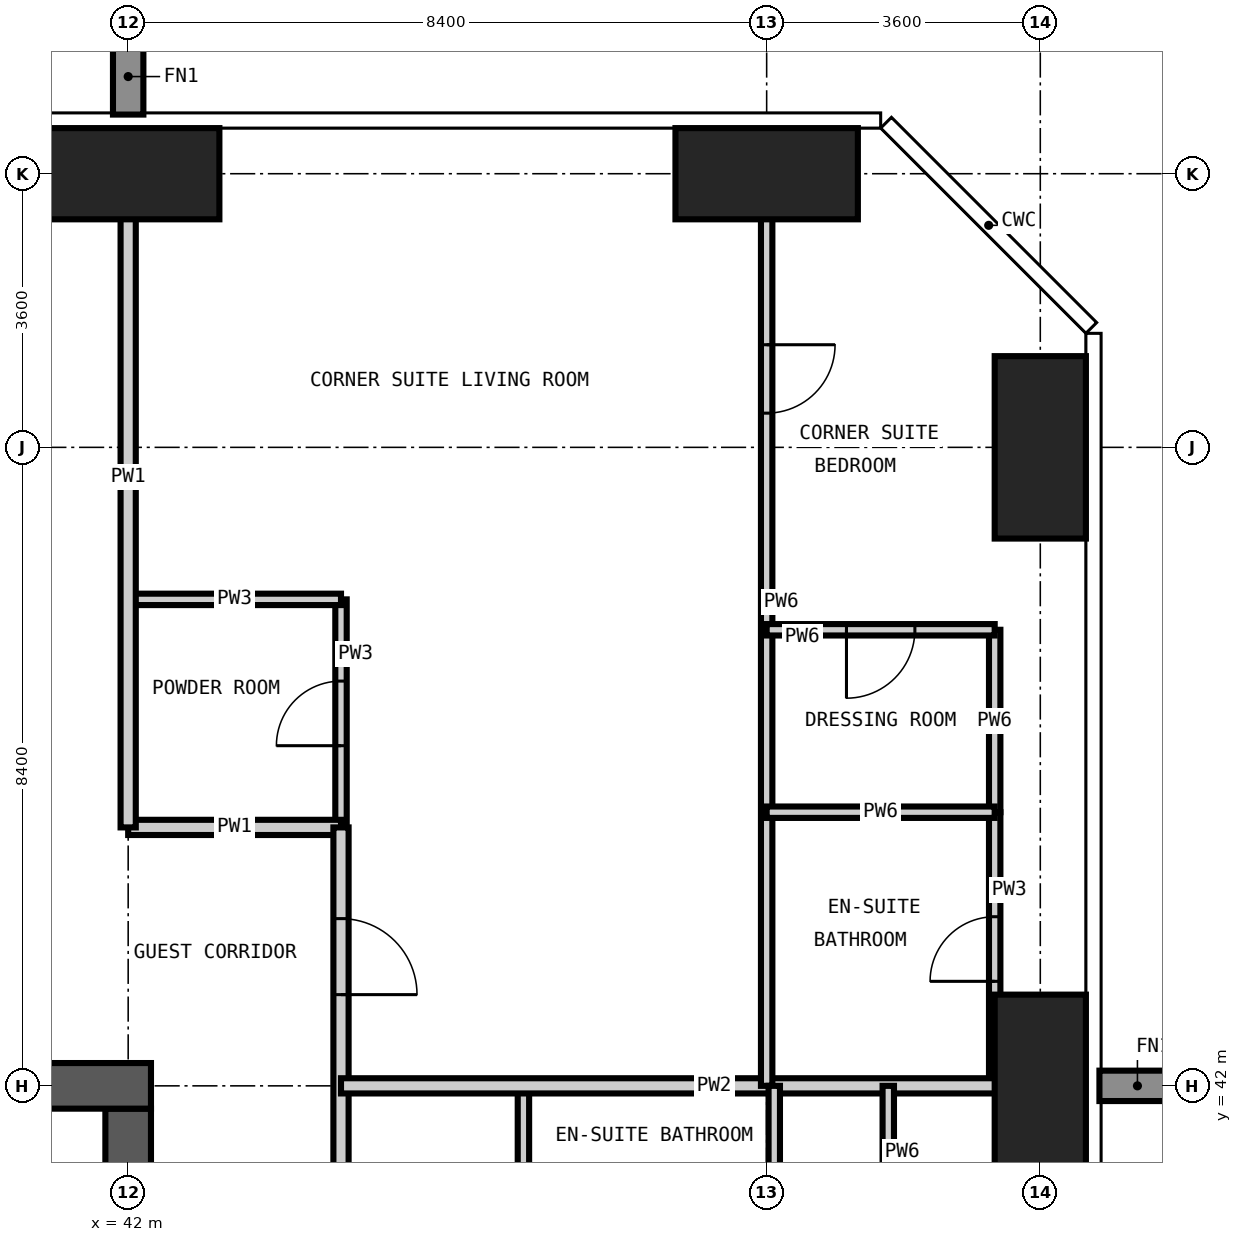
"""IFC4 building model, lengths in metres.
Left out: names, types, materials, properties, quantities, classifications, styles, units other than length and angle.
Written with IfcOpenShell. Run it as: python <this file> out.ifc"""

import sys

from ifc_helpers import new_model, si_unit, direction, frame, frame_2d, origin, origin_2d, place, context, subcontext, project, spatial, rectangle, extrude, element, fill, save


model = new_model("IFC4")
c1 = context("Model", 3, precision=1e-05, world=origin(), true_north=direction((0.0, 1.0)))
c2 = subcontext(c1, "Body", "Model", "MODEL_VIEW")
j1 = project(units=[si_unit("LENGTHUNIT", "METRE"), si_unit("PLANEANGLEUNIT", "RADIAN")], contexts=[c1])
p1 = place(None, origin())
s1 = spatial("IfcSite", under=j1, at=p1, CompositionType="ELEMENT")
p2 = place(p1, origin())
s2 = spatial("IfcBuilding", under=s1, at=p2, CompositionType="ELEMENT")
p3 = place(p2, frame((0.0, 0.0, 180.6)))
s3 = spatial("IfcBuildingStorey", under=s2, at=p3, CompositionType="ELEMENT", Elevation=180.6)
for number, where, z_axis, x_axis in (
    (1, (42.0, 54.0, -0.35), (0.0, 0.0, 1.0), (1.0, 0.0, 0.0)),
    (2, (50.4, 54.0, -0.35), (0.0, 0.0, 1.0), (1.0, 0.0, 0.0)),
):
    element("IfcColumn", number, at=place(p3, frame(where, z_axis=z_axis, x_axis=x_axis)), inside=s3, PredefinedType="COLUMN", context=c2, shape_type="SweptSolid", body=[
        extrude(rectangle(XDim=2.4, YDim=1.2, at=origin_2d()), origin(), (0.0, 0.0, 1.0), 3.6),
    ])
for number, where, z_axis, x_axis in (
    (3, (54.0, 42.0, -0.35), (0.0, 0.0, 1.0), (1.0, 0.0, 0.0)),
    (4, (54.0, 50.4, -0.35), (0.0, 0.0, 1.0), (1.0, 0.0, 0.0)),
):
    element("IfcColumn", number, at=place(p3, frame(where, z_axis=z_axis, x_axis=x_axis)), inside=s3, PredefinedType="COLUMN", context=c2, shape_type="SweptSolid", body=[
        extrude(rectangle(XDim=1.2, YDim=2.4, at=origin_2d()), origin(), (0.0, 0.0, 1.0), 3.6),
    ])
p4 = place(p3, frame((42.0, 17.1, -0.35), z_axis=(0.0, 0.0, 1.0), x_axis=(0.0, 1.0, 0.0)))
e5 = element("IfcWall", 5, at=p4, inside=s3, PredefinedType="SHEAR", context=c2, shape_type="SweptSolid", body=[
    extrude(rectangle(XDim=24.6, YDim=0.6, at=frame_2d((12.3, 0.0))), origin(), (0.0, 0.0, 1.0), 3.6),
])
p5 = place(p4, frame((0.5, 0.0, 0.35)))
e6 = element("IfcOpeningElement", 6, at=p5, cuts=e5, PredefinedType="OPENING", context=c2, shape_type="SweptSolid", body=[
    extrude(rectangle(XDim=1.2, YDim=2.2, at=frame_2d((0.6, 1.1))), frame((0.0, 0.31, 0.0), z_axis=(0.0, -1.0, 0.0), x_axis=(1.0, 0.0, 0.0)), (0.0, 0.0, 1.0), 0.62),
])
p6 = place(p4, frame((11.8, 0.0, 0.35)))
e7 = element("IfcOpeningElement", 7, at=p6, cuts=e5, PredefinedType="OPENING", context=c2, shape_type="SweptSolid", body=[
    extrude(rectangle(XDim=1.0, YDim=2.1, at=frame_2d((0.5, 1.05))), frame((0.0, 0.31, 0.0), z_axis=(0.0, -1.0, 0.0), x_axis=(1.0, 0.0, 0.0)), (0.0, 0.0, 1.0), 0.62),
])
p7 = place(p4, frame((20.2, 0.0, 0.35)))
e8 = element("IfcOpeningElement", 8, at=p7, cuts=e5, PredefinedType="OPENING", context=c2, shape_type="SweptSolid", body=[
    extrude(rectangle(XDim=1.0, YDim=2.1, at=frame_2d((0.5, 1.05))), frame((0.0, 0.31, 0.0), z_axis=(0.0, -1.0, 0.0), x_axis=(1.0, 0.0, 0.0)), (0.0, 0.0, 1.0), 0.62),
])
p8 = place(p3, frame((42.3, 42.0, -0.35), z_axis=(0.0, 0.0, 1.0), x_axis=(-1.0, 0.0, 0.0)))
e9 = element("IfcWall", 9, at=p8, inside=s3, PredefinedType="SHEAR", context=c2, shape_type="SweptSolid", body=[
    extrude(rectangle(XDim=25.8, YDim=0.6, at=frame_2d((12.9, 0.0))), origin(), (0.0, 0.0, 1.0), 3.6),
])
p9 = place(p8, frame((20.8, 0.0, 0.35)))
e10 = element("IfcOpeningElement", 10, at=p9, cuts=e9, PredefinedType="OPENING", context=c2, shape_type="SweptSolid", body=[
    extrude(rectangle(XDim=1.0, YDim=2.1, at=frame_2d((0.5, 1.05))), frame((0.0, 0.31, 0.0), z_axis=(0.0, -1.0, 0.0), x_axis=(1.0, 0.0, 0.0)), (0.0, 0.0, 1.0), 0.62),
])
p10 = place(p8, frame((10.2, 0.0, 0.35)))
e11 = element("IfcOpeningElement", 11, at=p10, cuts=e9, PredefinedType="OPENING", context=c2, shape_type="SweptSolid", body=[
    extrude(rectangle(XDim=1.2, YDim=2.2, at=frame_2d((0.6, 1.1))), frame((0.0, 0.31, 0.0), z_axis=(0.0, -1.0, 0.0), x_axis=(1.0, 0.0, 0.0)), (0.0, 0.0, 1.0), 0.62),
])
p11 = place(p3, frame((44.8, 45.4, 0.0), z_axis=(0.0, 0.0, 1.0), x_axis=(0.0, 1.0, 0.0)))
e12 = element("IfcWall", 12, at=p11, inside=s3, PredefinedType="PARTITIONING", context=c2, shape_type="SweptSolid", body=[
    extrude(rectangle(XDim=3.0, YDim=0.15, at=frame_2d((1.5, 0.0))), origin(), (0.0, 0.0, 1.0), 3.25),
])
p12 = place(p11, frame((1.075, 0.0, 0.0)))
e13 = element("IfcOpeningElement", 13, at=p12, cuts=e12, PredefinedType="OPENING", context=c2, shape_type="SweptSolid", body=[
    extrude(rectangle(XDim=0.85, YDim=2.1, at=frame_2d((0.425, 1.05))), frame((0.0, 0.085, 0.0), z_axis=(0.0, -1.0, 0.0), x_axis=(1.0, 0.0, 0.0)), (0.0, 0.0, 1.0), 0.17),
])
p13 = place(p3, frame((47.2, 39.6, 0.0), z_axis=(0.0, 0.0, 1.0), x_axis=(0.0, 1.0, 0.0)))
e14 = element("IfcWall", 14, at=p13, inside=s3, PredefinedType="PARTITIONING", context=c2, shape_type="SweptSolid", body=[
    extrude(rectangle(XDim=2.4, YDim=0.15, at=frame_2d((1.2, 0.0))), origin(), (0.0, 0.0, 1.0), 3.25),
])
p14 = place(p3, frame((53.4, 42.0, 0.0), z_axis=(0.0, 0.0, 1.0), x_axis=(0.0, 1.0, 0.0)))
e15 = element("IfcWall", 15, at=p14, inside=s3, PredefinedType="PARTITIONING", context=c2, shape_type="SweptSolid", body=[
    extrude(rectangle(XDim=3.6, YDim=0.15, at=frame_2d((1.8, 0.0))), origin(), (0.0, 0.0, 1.0), 3.25),
])
p15 = place(p14, frame((1.375, 0.0, 0.0)))
e16 = element("IfcOpeningElement", 16, at=p15, cuts=e15, PredefinedType="OPENING", context=c2, shape_type="SweptSolid", body=[
    extrude(rectangle(XDim=0.85, YDim=2.1, at=frame_2d((0.425, 1.05))), frame((0.0, 0.085, 0.0), z_axis=(0.0, -1.0, 0.0), x_axis=(1.0, 0.0, 0.0)), (0.0, 0.0, 1.0), 0.17),
])
p16 = place(p3, frame((42.0, 48.4, 0.0), z_axis=(0.0, 0.0, 1.0), x_axis=(1.0, 0.0, 0.0)))
e17 = element("IfcWall", 17, at=p16, inside=s3, PredefinedType="PARTITIONING", context=c2, shape_type="SweptSolid", body=[
    extrude(rectangle(XDim=2.8, YDim=0.15, at=frame_2d((1.4, 0.0))), origin(), (0.0, 0.0, 1.0), 3.25),
])
p17 = place(p3, frame((42.0, 45.4, 0.0), z_axis=(0.0, 0.0, 1.0), x_axis=(1.0, 0.0, 0.0)))
e18 = element("IfcWall", 18, at=p17, inside=s3, PredefinedType="PARTITIONING", context=c2, shape_type="SweptSolid", body=[
    extrude(rectangle(XDim=2.8, YDim=0.2, at=frame_2d((1.4, 0.0))), origin(), (0.0, 0.0, 1.0), 3.25),
])
p18 = place(p3, frame((42.0, 54.618, 0.0), z_axis=(0.0, 0.0, 1.0), x_axis=(0.0, -1.0, 0.0)))
e19 = element("IfcWall", 19, at=p18, inside=s3, PredefinedType="PARTITIONING", context=c2, shape_type="SweptSolid", body=[
    extrude(rectangle(XDim=9.218, YDim=0.2, at=frame_2d((4.609, 0.0))), origin(), (0.0, 0.0, 1.0), 3.25),
])
p19 = place(p3, frame((44.8, 45.4, 0.0), z_axis=(0.0, 0.0, 1.0), x_axis=(0.0, -1.0, 0.0)))
e20 = element("IfcWall", 20, at=p19, inside=s3, PredefinedType="PARTITIONING", context=c2, shape_type="SweptSolid", body=[
    extrude(rectangle(XDim=30.8, YDim=0.2, at=frame_2d((15.4, 0.0))), origin(), (0.0, 0.0, 1.0), 3.25),
])
p20 = place(p19, frame((26.0, 0.0, 0.0)))
e21 = element("IfcOpeningElement", 21, at=p20, cuts=e20, PredefinedType="OPENING", context=c2, shape_type="SweptSolid", body=[
    extrude(rectangle(XDim=1.0, YDim=2.2, at=frame_2d((0.5, 1.1))), frame((0.0, 0.11, 0.0), z_axis=(0.0, -1.0, 0.0), x_axis=(1.0, 0.0, 0.0)), (0.0, 0.0, 1.0), 0.22),
])
p21 = place(p19, frame((21.8, 0.0, 0.0)))
e22 = element("IfcOpeningElement", 22, at=p21, cuts=e20, PredefinedType="OPENING", context=c2, shape_type="SweptSolid", body=[
    extrude(rectangle(XDim=1.0, YDim=2.2, at=frame_2d((0.5, 1.1))), frame((0.0, 0.11, 0.0), z_axis=(0.0, -1.0, 0.0), x_axis=(1.0, 0.0, 0.0)), (0.0, 0.0, 1.0), 0.22),
])
p22 = place(p19, frame((17.6, 0.0, 0.0)))
e23 = element("IfcOpeningElement", 23, at=p22, cuts=e20, PredefinedType="OPENING", context=c2, shape_type="SweptSolid", body=[
    extrude(rectangle(XDim=1.0, YDim=2.2, at=frame_2d((0.5, 1.1))), frame((0.0, 0.11, 0.0), z_axis=(0.0, -1.0, 0.0), x_axis=(1.0, 0.0, 0.0)), (0.0, 0.0, 1.0), 0.22),
])
p23 = place(p19, frame((13.4, 0.0, 0.0)))
e24 = element("IfcOpeningElement", 24, at=p23, cuts=e20, PredefinedType="OPENING", context=c2, shape_type="SweptSolid", body=[
    extrude(rectangle(XDim=1.0, YDim=2.2, at=frame_2d((0.5, 1.1))), frame((0.0, 0.11, 0.0), z_axis=(0.0, -1.0, 0.0), x_axis=(1.0, 0.0, 0.0)), (0.0, 0.0, 1.0), 0.22),
])
p24 = place(p19, frame((9.2, 0.0, 0.0)))
e25 = element("IfcOpeningElement", 25, at=p24, cuts=e20, PredefinedType="OPENING", context=c2, shape_type="SweptSolid", body=[
    extrude(rectangle(XDim=1.0, YDim=2.2, at=frame_2d((0.5, 1.1))), frame((0.0, 0.11, 0.0), z_axis=(0.0, -1.0, 0.0), x_axis=(1.0, 0.0, 0.0)), (0.0, 0.0, 1.0), 0.22),
])
p25 = place(p19, frame((5.0, 0.0, 0.0)))
e26 = element("IfcOpeningElement", 26, at=p25, cuts=e20, PredefinedType="OPENING", context=c2, shape_type="SweptSolid", body=[
    extrude(rectangle(XDim=1.0, YDim=2.2, at=frame_2d((0.5, 1.1))), frame((0.0, 0.11, 0.0), z_axis=(0.0, -1.0, 0.0), x_axis=(1.0, 0.0, 0.0)), (0.0, 0.0, 1.0), 0.22),
])
p26 = place(p19, frame((29.2, 0.0, 0.0)))
e27 = element("IfcOpeningElement", 27, at=p26, cuts=e20, PredefinedType="OPENING", context=c2, shape_type="SweptSolid", body=[
    extrude(rectangle(XDim=1.0, YDim=2.2, at=frame_2d((0.5, 1.1))), frame((0.0, 0.11, 0.0), z_axis=(0.0, -1.0, 0.0), x_axis=(1.0, 0.0, 0.0)), (0.0, 0.0, 1.0), 0.22),
])
p27 = place(p19, frame((1.2, 0.0, 0.0)))
e28 = element("IfcOpeningElement", 28, at=p27, cuts=e20, PredefinedType="OPENING", context=c2, shape_type="SweptSolid", body=[
    extrude(rectangle(XDim=1.0, YDim=2.2, at=frame_2d((0.5, 1.1))), frame((0.0, 0.11, 0.0), z_axis=(0.0, -1.0, 0.0), x_axis=(1.0, 0.0, 0.0)), (0.0, 0.0, 1.0), 0.22),
])
p28 = place(p3, frame((44.8, 42.0, 0.0), z_axis=(0.0, 0.0, 1.0), x_axis=(1.0, 0.0, 0.0)))
e29 = element("IfcWall", 29, at=p28, inside=s3, PredefinedType="PARTITIONING", context=c2, shape_type="SweptSolid", body=[
    extrude(rectangle(XDim=9.818, YDim=0.2, at=frame_2d((4.909, 0.0))), origin(), (0.0, 0.0, 1.0), 3.25),
])
p29 = place(p3, frame((50.4, 42.0, 0.0), z_axis=(0.0, 0.0, 1.0), x_axis=(0.0, 1.0, 0.0)))
e30 = element("IfcWall", 30, at=p29, inside=s3, PredefinedType="PARTITIONING", context=c2, shape_type="SweptSolid", body=[
    extrude(rectangle(XDim=12.618, YDim=0.15, at=frame_2d((6.309, 0.0))), origin(), (0.0, 0.0, 1.0), 3.25),
])
p30 = place(p29, frame((8.85, 0.0, 0.0)))
e31 = element("IfcOpeningElement", 31, at=p30, cuts=e30, PredefinedType="OPENING", context=c2, shape_type="SweptSolid", body=[
    extrude(rectangle(XDim=0.9, YDim=2.1, at=frame_2d((0.45, 1.05))), frame((0.0, 0.085, 0.0), z_axis=(0.0, -1.0, 0.0), x_axis=(1.0, 0.0, 0.0)), (0.0, 0.0, 1.0), 0.17),
])
p31 = place(p3, frame((50.5, 39.6, 0.0), z_axis=(0.0, 0.0, 1.0), x_axis=(0.0, 1.0, 0.0)))
e32 = element("IfcWall", 32, at=p31, inside=s3, PredefinedType="PARTITIONING", context=c2, shape_type="SweptSolid", body=[
    extrude(rectangle(XDim=2.4, YDim=0.15, at=frame_2d((1.2, 0.0))), origin(), (0.0, 0.0, 1.0), 3.25),
])
p32 = place(p3, frame((52.0, 39.6, 0.0), z_axis=(0.0, 0.0, 1.0), x_axis=(0.0, 1.0, 0.0)))
e33 = element("IfcWall", 33, at=p32, inside=s3, PredefinedType="PARTITIONING", context=c2, shape_type="SweptSolid", body=[
    extrude(rectangle(XDim=2.4, YDim=0.15, at=frame_2d((1.2, 0.0))), origin(), (0.0, 0.0, 1.0), 3.25),
])
p33 = place(p32, frame((0.25, 0.0, 0.0)))
e34 = element("IfcOpeningElement", 34, at=p33, cuts=e33, PredefinedType="OPENING", context=c2, shape_type="SweptSolid", body=[
    extrude(rectangle(XDim=0.9, YDim=2.1, at=frame_2d((0.45, 1.05))), frame((0.0, 0.085, 0.0), z_axis=(0.0, -1.0, 0.0), x_axis=(1.0, 0.0, 0.0)), (0.0, 0.0, 1.0), 0.17),
])
p34 = place(p3, frame((53.4, 45.6, 0.0), z_axis=(0.0, 0.0, 1.0), x_axis=(0.0, 1.0, 0.0)))
e35 = element("IfcWall", 35, at=p34, inside=s3, PredefinedType="PARTITIONING", context=c2, shape_type="SweptSolid", body=[
    extrude(rectangle(XDim=2.4, YDim=0.15, at=frame_2d((1.2, 0.0))), origin(), (0.0, 0.0, 1.0), 3.25),
])
p35 = place(p3, frame((50.4, 45.6, 0.0), z_axis=(0.0, 0.0, 1.0), x_axis=(1.0, 0.0, 0.0)))
e36 = element("IfcWall", 36, at=p35, inside=s3, PredefinedType="PARTITIONING", context=c2, shape_type="SweptSolid", body=[
    extrude(rectangle(XDim=3.0, YDim=0.15, at=frame_2d((1.5, 0.0))), origin(), (0.0, 0.0, 1.0), 3.25),
])
p36 = place(p3, frame((50.4, 48.0, 0.0), z_axis=(0.0, 0.0, 1.0), x_axis=(1.0, 0.0, 0.0)))
e37 = element("IfcWall", 37, at=p36, inside=s3, PredefinedType="PARTITIONING", context=c2, shape_type="SweptSolid", body=[
    extrude(rectangle(XDim=3.0, YDim=0.15, at=frame_2d((1.5, 0.0))), origin(), (0.0, 0.0, 1.0), 3.25),
])
p37 = place(p36, frame((1.05, 0.0, 0.0)))
e38 = element("IfcOpeningElement", 38, at=p37, cuts=e37, PredefinedType="OPENING", context=c2, shape_type="SweptSolid", body=[
    extrude(rectangle(XDim=0.9, YDim=2.1, at=frame_2d((0.45, 1.05))), frame((0.0, 0.085, 0.0), z_axis=(0.0, -1.0, 0.0), x_axis=(1.0, 0.0, 0.0)), (0.0, 0.0, 1.0), 0.17),
])
p38 = place(p27, origin())
e39 = element("IfcDoor", 39, at=p38, inside=s3, OperationType="SINGLE_SWING_RIGHT", PredefinedType="DOOR", context=c2, shape_type="SweptSolid", body=[
    extrude(rectangle(XDim=1.0, YDim=2.2, at=frame_2d((0.5, 1.1))), frame((0.0, 0.025, 0.0), z_axis=(0.0, -1.0, 0.0), x_axis=(1.0, 0.0, 0.0)), (0.0, 0.0, 1.0), 0.05),
])
fill(e28, e39)
p39 = place(p12, origin())
e40 = element("IfcDoor", 40, at=p39, inside=s3, OperationType="SINGLE_SWING_LEFT", PredefinedType="DOOR", context=c2, shape_type="SweptSolid", body=[
    extrude(rectangle(XDim=0.85, YDim=2.1, at=frame_2d((0.425, 1.05))), frame((0.0, 0.025, 0.0), z_axis=(0.0, -1.0, 0.0), x_axis=(1.0, 0.0, 0.0)), (0.0, 0.0, 1.0), 0.05),
])
fill(e13, e40)
p40 = place(p30, frame((0.9, 0.0, 0.0), z_axis=(0.0, 0.0, 1.0), x_axis=(-1.0, 0.0, 0.0)))
e41 = element("IfcDoor", 41, at=p40, inside=s3, OperationType="SINGLE_SWING_LEFT", PredefinedType="DOOR", context=c2, shape_type="SweptSolid", body=[
    extrude(rectangle(XDim=0.9, YDim=2.1, at=frame_2d((0.45, 1.05))), frame((0.0, 0.025, 0.0), z_axis=(0.0, -1.0, 0.0), x_axis=(1.0, 0.0, 0.0)), (0.0, 0.0, 1.0), 0.05),
])
fill(e31, e41)
p41 = place(p15, origin())
e42 = element("IfcDoor", 42, at=p41, inside=s3, OperationType="SINGLE_SWING_LEFT", PredefinedType="DOOR", context=c2, shape_type="SweptSolid", body=[
    extrude(rectangle(XDim=0.85, YDim=2.1, at=frame_2d((0.425, 1.05))), frame((0.0, 0.025, 0.0), z_axis=(0.0, -1.0, 0.0), x_axis=(1.0, 0.0, 0.0)), (0.0, 0.0, 1.0), 0.05),
])
fill(e16, e42)
p42 = place(p37, frame((0.9, 0.0, 0.0), z_axis=(0.0, 0.0, 1.0), x_axis=(-1.0, 0.0, 0.0)))
e43 = element("IfcDoor", 43, at=p42, inside=s3, OperationType="SINGLE_SWING_RIGHT", PredefinedType="DOOR", context=c2, shape_type="SweptSolid", body=[
    extrude(rectangle(XDim=0.9, YDim=2.1, at=frame_2d((0.45, 1.05))), frame((0.0, 0.025, 0.0), z_axis=(0.0, -1.0, 0.0), x_axis=(1.0, 0.0, 0.0)), (0.0, 0.0, 1.0), 0.05),
])
fill(e38, e43)
save(model, sys.argv[1])
